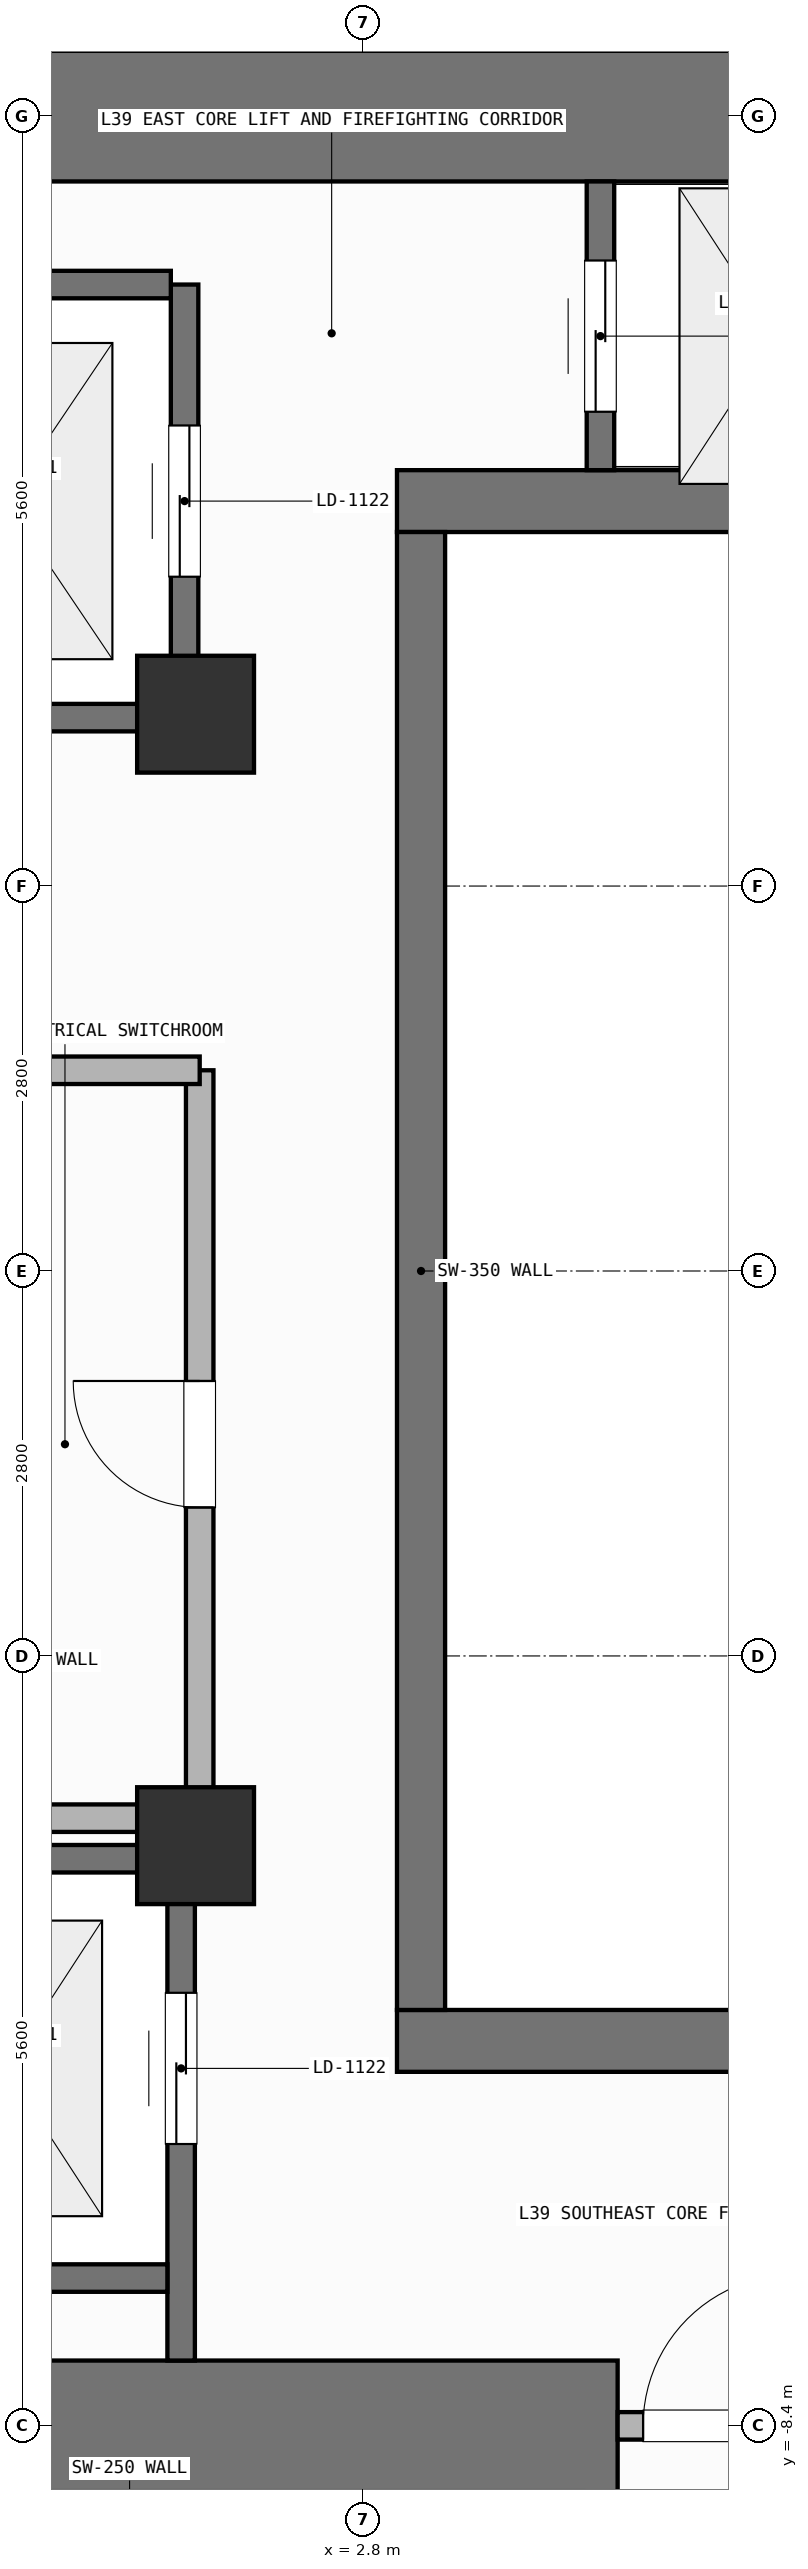
"""IFC4 building model, lengths in metres.
Left out: names, types, materials, properties, quantities, classifications, styles, units other than length and angle.
Written with IfcOpenShell. Run it as: python <this file> out.ifc"""

import sys

from ifc_helpers import new_model, si_unit, direction, frame, frame_2d, origin, origin_2d, place, context, subcontext, project, spatial, rectangle, extrude, element, fill, save


model = new_model("IFC4")
c1 = context("Model", 3, precision=1e-05, world=origin(), true_north=direction((0.0, 1.0)))
c2 = subcontext(c1, "Body", "Model", "MODEL_VIEW")
j1 = project(units=[si_unit("LENGTHUNIT", "METRE"), si_unit("PLANEANGLEUNIT", "RADIAN")], contexts=[c1])
p1 = place(None, origin())
s1 = spatial("IfcSite", under=j1, at=p1, CompositionType="ELEMENT")
p2 = place(p1, origin())
s2 = spatial("IfcBuilding", under=s1, at=p2, CompositionType="ELEMENT")
p3 = place(p2, frame((0.0, 0.0, 156.3)))
s3 = spatial("IfcBuildingStorey", under=s2, at=p3, CompositionType="ELEMENT", Elevation=156.3)
p4 = place(p3, frame((-2.62, -8.4, 0.0), z_axis=(0.0, 0.0, 1.0), x_axis=(1.0, 0.0, 0.0)))
e1 = element("IfcWall", 1, at=p4, inside=s3, PredefinedType="SHEAR", context=c2, shape_type="SweptSolid", body=[
    extrude(rectangle(XDim=7.27, YDim=0.95, at=frame_2d((3.635, 0.0))), origin(), (0.0, 0.0, 1.0), 7.8),
])
p5 = place(p3, frame((-7.55, 8.4, 0.0), z_axis=(0.0, 0.0, 1.0), x_axis=(1.0, 0.0, 0.0)))
e2 = element("IfcWall", 2, at=p5, inside=s3, PredefinedType="SHEAR", context=c2, shape_type="SweptSolid", body=[
    extrude(rectangle(XDim=16.425, YDim=0.95, at=frame_2d((8.212, 0.0))), origin(), (0.0, 0.0, 1.0), 7.8),
])
for number, where, z_axis, x_axis in (
    (3, (3.045, -5.6, 0.0), (0.0, 0.0, 1.0), (1.0, 0.0, 0.0)),
    (4, (3.045, 5.6, 0.0), (0.0, 0.0, 1.0), (1.0, 0.0, 0.0)),
):
    element("IfcWall", number, at=place(p3, frame(where, z_axis=z_axis, x_axis=x_axis)), inside=s3, PredefinedType="SHEAR", context=c2, shape_type="SweptSolid", body=[
        extrude(rectangle(XDim=5.83, YDim=0.45, at=frame_2d((2.915, 0.0))), origin(), (0.0, 0.0, 1.0), 7.8),
    ])
p6 = place(p3, frame((3.22, -5.375, 0.0), z_axis=(0.0, 0.0, 1.0), x_axis=(0.0, 1.0, 0.0)))
e5 = element("IfcWall", 5, at=p6, inside=s3, PredefinedType="SHEAR", context=c2, shape_type="SweptSolid", body=[
    extrude(rectangle(XDim=10.75, YDim=0.35, at=frame_2d((5.375, 0.0))), origin(), (0.0, 0.0, 1.0), 7.8),
])
for number, where, z_axis, x_axis in (
    (6, (1.58, -4.18, 0.0), (0.0, 0.0, 1.0), (1.0, 0.0, 0.0)),
    (7, (1.58, 4.05, 0.0), (0.0, 0.0, 1.0), (1.0, 0.0, 0.0)),
):
    element("IfcColumn", number, at=place(p3, frame(where, z_axis=z_axis, x_axis=x_axis)), inside=s3, PredefinedType="COLUMN", context=c2, shape_type="SweptSolid", body=[
        extrude(rectangle(XDim=0.85, YDim=0.85, at=origin_2d()), origin(), (0.0, 0.0, 1.0), 7.8),
    ])
p7 = place(p3, frame((1.5, 4.025, 0.0), z_axis=(0.0, 0.0, 1.0), x_axis=(0.0, 1.0, 0.0)))
e8 = element("IfcWall", 8, at=p7, inside=s3, PredefinedType="SHEAR", context=c2, shape_type="SweptSolid", body=[
    extrude(rectangle(XDim=3.15, YDim=0.2, at=frame_2d((1.575, 0.0))), origin(), (0.0, 0.0, 1.0), 7.58),
])
p8 = place(p7, frame((1.025, 0.0, 0.0)))
e9 = element("IfcOpeningElement", 9, at=p8, cuts=e8, PredefinedType="OPENING", context=c2, shape_type="SweptSolid", body=[
    extrude(rectangle(XDim=1.1, YDim=2.2, at=frame_2d((0.55, 1.1))), frame((0.0, 0.11, 0.0), z_axis=(0.0, -1.0, 0.0), x_axis=(1.0, 0.0, 0.0)), (0.0, 0.0, 1.0), 0.22),
])
for number, where, z_axis, x_axis in (
    (10, (-1.0, 4.025, 0.0), (0.0, 0.0, 1.0), (1.0, 0.0, 0.0)),
    (11, (-1.0, 7.175, 0.0), (0.0, 0.0, 1.0), (1.0, 0.0, 0.0)),
):
    element("IfcWall", number, at=place(p3, frame(where, z_axis=z_axis, x_axis=x_axis)), inside=s3, PredefinedType="SHEAR", context=c2, shape_type="SweptSolid", body=[
        extrude(rectangle(XDim=2.4, YDim=0.2, at=frame_2d((1.2, 0.0))), origin(), (0.0, 0.0, 1.0), 7.58),
    ])
p9 = place(p3, frame((1.475, -7.925, 0.0), z_axis=(0.0, 0.0, 1.0), x_axis=(0.0, 1.0, 0.0)))
e12 = element("IfcWall", 12, at=p9, inside=s3, PredefinedType="SHEAR", context=c2, shape_type="SweptSolid", body=[
    extrude(rectangle(XDim=3.65, YDim=0.2, at=frame_2d((1.825, 0.0))), origin(), (0.0, 0.0, 1.0), 7.58),
])
p10 = place(p9, frame((1.575, 0.0, 0.0)))
e13 = element("IfcOpeningElement", 13, at=p10, cuts=e12, PredefinedType="OPENING", context=c2, shape_type="SweptSolid", body=[
    extrude(rectangle(XDim=1.1, YDim=2.2, at=frame_2d((0.55, 1.1))), frame((0.0, 0.11, 0.0), z_axis=(0.0, -1.0, 0.0), x_axis=(1.0, 0.0, 0.0)), (0.0, 0.0, 1.0), 0.22),
])
for number, where, z_axis, x_axis in (
    (14, (-0.975, -7.325, 0.0), (0.0, 0.0, 1.0), (1.0, 0.0, 0.0)),
    (15, (-0.975, -4.275, 0.0), (0.0, 0.0, 1.0), (1.0, 0.0, 0.0)),
):
    element("IfcWall", number, at=place(p3, frame(where, z_axis=z_axis, x_axis=x_axis)), inside=s3, PredefinedType="SHEAR", context=c2, shape_type="SweptSolid", body=[
        extrude(rectangle(XDim=2.35, YDim=0.2, at=frame_2d((1.175, 0.0))), origin(), (0.0, 0.0, 1.0), 7.58),
    ])
p11 = place(p3, frame((4.525, 5.825, 0.0), z_axis=(0.0, 0.0, 1.0), x_axis=(0.0, 1.0, 0.0)))
e16 = element("IfcWall", 16, at=p11, inside=s3, PredefinedType="SHEAR", context=c2, shape_type="SweptSolid", body=[
    extrude(rectangle(XDim=2.1, YDim=0.2, at=frame_2d((1.05, 0.0))), origin(), (0.0, 0.0, 1.0), 7.58),
])
p12 = place(p11, frame((0.425, 0.0, 0.0)))
e17 = element("IfcOpeningElement", 17, at=p12, cuts=e16, PredefinedType="OPENING", context=c2, shape_type="SweptSolid", body=[
    extrude(rectangle(XDim=1.1, YDim=2.2, at=frame_2d((0.55, 1.1))), frame((0.0, 0.11, 0.0), z_axis=(0.0, -1.0, 0.0), x_axis=(1.0, 0.0, 0.0)), (0.0, 0.0, 1.0), 0.22),
])
p13 = place(p3, frame((4.65, -8.4, 0.0), z_axis=(0.0, 0.0, 1.0), x_axis=(1.0, 0.0, 0.0)))
e18 = element("IfcWall", 18, at=p13, inside=s3, PredefinedType="SOLIDWALL", context=c2, shape_type="SweptSolid", body=[
    extrude(rectangle(XDim=1.47, YDim=0.2, at=frame_2d((0.735, 0.0))), origin(), (0.0, 0.0, 1.0), 6.62),
])
p14 = place(p13, frame((0.185, 0.0, 0.0)))
e19 = element("IfcOpeningElement", 19, at=p14, cuts=e18, PredefinedType="OPENING", context=c2, shape_type="SweptSolid", body=[
    extrude(rectangle(XDim=1.1, YDim=2.15, at=frame_2d((0.55, 1.075))), frame((0.0, 0.11, 0.0), z_axis=(0.0, -1.0, 0.0), x_axis=(1.0, 0.0, 0.0)), (0.0, 0.0, 1.0), 0.22),
])
p15 = place(p3, frame((1.61, -3.98, 0.0), z_axis=(0.0, 0.0, 1.0), x_axis=(0.0, 1.0, 0.0)))
e20 = element("IfcWall", 20, at=p15, inside=s3, PredefinedType="SOLIDWALL", context=c2, shape_type="SweptSolid", body=[
    extrude(rectangle(XDim=5.44, YDim=0.2, at=frame_2d((2.72, 0.0))), origin(), (0.0, 0.0, 1.0), 7.58),
])
p16 = place(p15, frame((2.26, 0.0, 0.0)))
e21 = element("IfcOpeningElement", 21, at=p16, cuts=e20, PredefinedType="OPENING", context=c2, shape_type="SweptSolid", body=[
    extrude(rectangle(XDim=0.92, YDim=2.1, at=frame_2d((0.46, 1.05))), frame((0.0, 0.11, 0.0), z_axis=(0.0, -1.0, 0.0), x_axis=(1.0, 0.0, 0.0)), (0.0, 0.0, 1.0), 0.22),
])
for number, where, z_axis, x_axis in (
    (22, (-1.58, -3.98, 0.0), (0.0, 0.0, 1.0), (1.0, 0.0, 0.0)),
    (23, (-1.58, 1.46, 0.0), (0.0, 0.0, 1.0), (1.0, 0.0, 0.0)),
):
    element("IfcWall", number, at=place(p3, frame(where, z_axis=z_axis, x_axis=x_axis)), inside=s3, PredefinedType="SOLIDWALL", context=c2, shape_type="SweptSolid", body=[
        extrude(rectangle(XDim=3.19, YDim=0.2, at=frame_2d((1.595, 0.0))), origin(), (0.0, 0.0, 1.0), 7.58),
    ])
p17 = place(p8, origin())
e24 = element("IfcDoor", 24, at=p17, inside=s3, OperationType="SLIDING_TO_LEFT", PredefinedType="DOOR", context=c2, shape_type="SweptSolid", body=[
    extrude(rectangle(XDim=1.1, YDim=2.2, at=frame_2d((0.55, 1.1))), frame((0.0, 0.025, 0.0), z_axis=(0.0, -1.0, 0.0), x_axis=(1.0, 0.0, 0.0)), (0.0, 0.0, 1.0), 0.05),
])
fill(e9, e24)
p18 = place(p10, origin())
e25 = element("IfcDoor", 25, at=p18, inside=s3, OperationType="SLIDING_TO_LEFT", PredefinedType="DOOR", context=c2, shape_type="SweptSolid", body=[
    extrude(rectangle(XDim=1.1, YDim=2.2, at=frame_2d((0.55, 1.1))), frame((0.0, 0.025, 0.0), z_axis=(0.0, -1.0, 0.0), x_axis=(1.0, 0.0, 0.0)), (0.0, 0.0, 1.0), 0.05),
])
fill(e13, e25)
p19 = place(p12, origin())
e26 = element("IfcDoor", 26, at=p19, inside=s3, OperationType="SLIDING_TO_LEFT", PredefinedType="DOOR", context=c2, shape_type="SweptSolid", body=[
    extrude(rectangle(XDim=1.1, YDim=2.2, at=frame_2d((0.55, 1.1))), frame((0.0, 0.025, 0.0), z_axis=(0.0, -1.0, 0.0), x_axis=(1.0, 0.0, 0.0)), (0.0, 0.0, 1.0), 0.05),
])
fill(e17, e26)
p20 = place(p14, origin())
e27 = element("IfcDoor", 27, at=p20, inside=s3, OperationType="SINGLE_SWING_RIGHT", PredefinedType="DOOR", context=c2, shape_type="SweptSolid", body=[
    extrude(rectangle(XDim=1.1, YDim=2.15, at=frame_2d((0.55, 1.075))), frame((0.0, 0.025, 0.0), z_axis=(0.0, -1.0, 0.0), x_axis=(1.0, 0.0, 0.0)), (0.0, 0.0, 1.0), 0.05),
])
fill(e19, e27)
p21 = place(p16, origin())
e28 = element("IfcDoor", 28, at=p21, inside=s3, OperationType="SINGLE_SWING_RIGHT", PredefinedType="DOOR", context=c2, shape_type="SweptSolid", body=[
    extrude(rectangle(XDim=0.92, YDim=2.1, at=frame_2d((0.46, 1.05))), frame((0.0, 0.025, 0.0), z_axis=(0.0, -1.0, 0.0), x_axis=(1.0, 0.0, 0.0)), (0.0, 0.0, 1.0), 0.05),
])
fill(e21, e28)
save(model, sys.argv[1])
